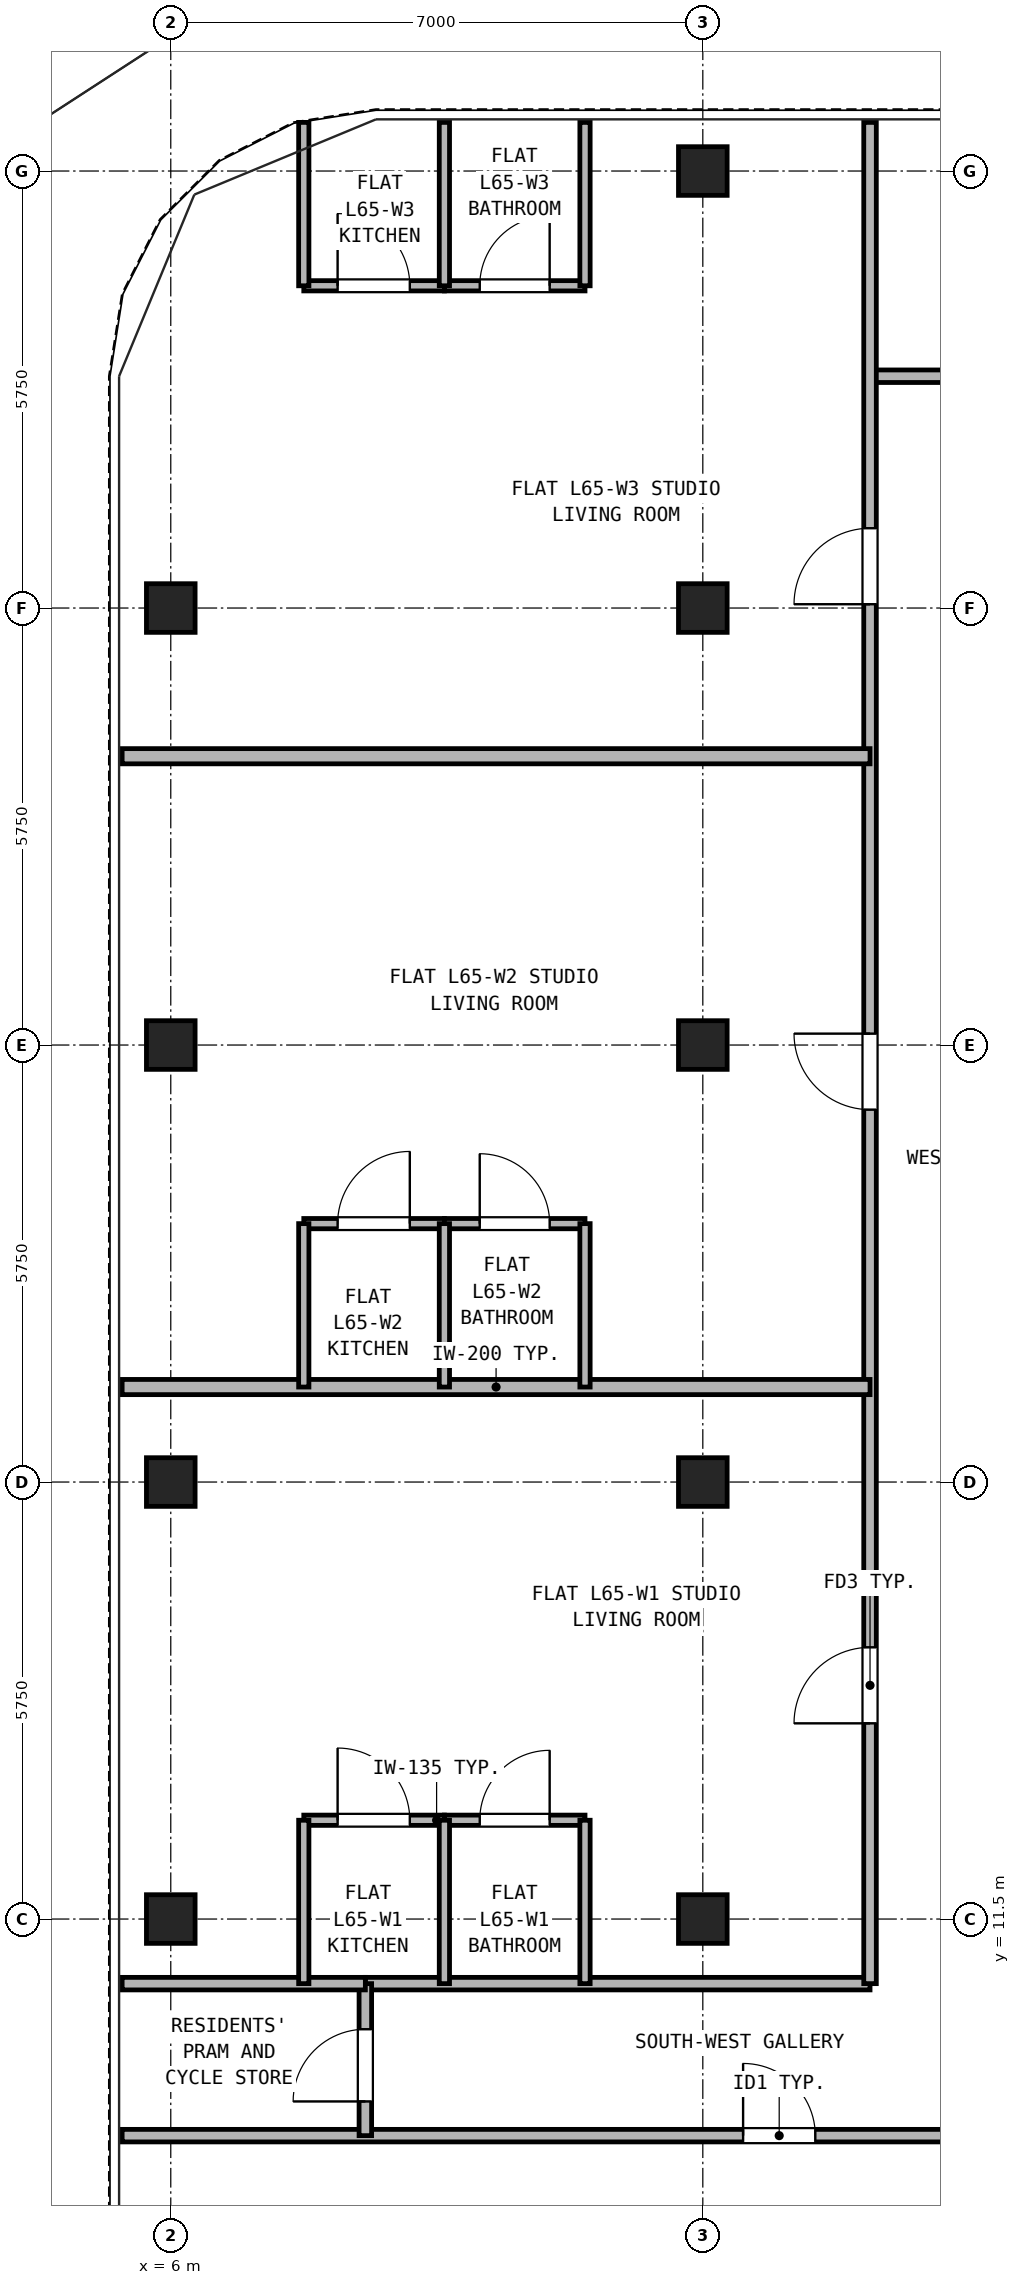
"""IFC4 building model, lengths in metres.
Left out: names, types, materials, properties, quantities, classifications, styles, units other than length and angle.
Written with IfcOpenShell. Run it as: python <this file> out.ifc"""

import sys

from ifc_helpers import new_model, si_unit, direction, frame, frame_2d, origin, origin_2d, place, context, subcontext, project, spatial, rectangle, hollow_rectangle, extrude, source, transform, mapped, element, fill, save


model = new_model("IFC4")
c1 = context("Model", 3, precision=1e-05, world=origin(), true_north=direction((0.0, 1.0)))
c2 = subcontext(c1, "Body", "Model", "MODEL_VIEW")
j1 = project(units=[si_unit("LENGTHUNIT", "METRE"), si_unit("PLANEANGLEUNIT", "RADIAN")], contexts=[c1])
p1 = place(None, origin())
s1 = spatial("IfcSite", under=j1, at=p1, CompositionType="ELEMENT")
p2 = place(p1, origin())
s2 = spatial("IfcBuilding", under=s1, at=p2, CompositionType="ELEMENT")
p3 = place(p2, frame((0.0, 0.0, 229.7)))
s3 = spatial("IfcBuildingStorey", under=s2, at=p3, CompositionType="ELEMENT", Elevation=229.7)
m1 = source(origin(), c2, "Body", "SweptSolid", [
    extrude(hollow_rectangle(XDim=0.64, YDim=0.64, WallThickness=0.035, at=origin_2d()), origin(), (0.0, 0.0, 1.0), 2.98),
])
for number, where, z_axis, x_axis in (
    (1, (13.0, 34.5, 0.0), (0.0, 0.0, 1.0), (1.0, 0.0, 0.0)),
    (2, (6.0, 11.5, 0.0), (0.0, 0.0, 1.0), (1.0, 0.0, 0.0)),
    (3, (6.0, 17.25, 0.0), (0.0, 0.0, 1.0), (1.0, 0.0, 0.0)),
    (4, (6.0, 23.0, 0.0), (0.0, 0.0, 1.0), (1.0, 0.0, 0.0)),
    (5, (6.0, 28.75, 0.0), (0.0, 0.0, 1.0), (1.0, 0.0, 0.0)),
    (6, (13.0, 11.5, 0.0), (0.0, 0.0, 1.0), (1.0, 0.0, 0.0)),
    (7, (13.0, 17.25, 0.0), (0.0, 0.0, 1.0), (1.0, 0.0, 0.0)),
    (8, (13.0, 23.0, 0.0), (0.0, 0.0, 1.0), (1.0, 0.0, 0.0)),
    (9, (13.0, 28.75, 0.0), (0.0, 0.0, 1.0), (1.0, 0.0, 0.0)),
):
    element("IfcColumn", number, at=place(p3, frame(where, z_axis=z_axis, x_axis=x_axis)), inside=s3, PredefinedType="COLUMN", context=c2, shape_type="MappedRepresentation", body=[
        mapped(m1, transform((0.0, 0.0, 0.0), x_axis=(1.0, 0.0, 0.0), y_axis=(0.0, 1.0, 0.0), z_axis=(0.0, 0.0, 1.0), scale=1.0)),
    ])
p4 = place(p3, frame((5.36, 8.65, 0.0), z_axis=(0.0, 0.0, 1.0), x_axis=(1.0, 0.0, 0.0)))
e10 = element("IfcWall", 10, at=p4, inside=s3, PredefinedType="PARTITIONING", context=c2, shape_type="SweptSolid", body=[
    extrude(rectangle(XDim=36.28, YDim=0.165, at=frame_2d((18.14, 0.0))), origin(), (0.0, 0.0, 1.0), 2.655),
])
p5 = place(p4, frame((8.17, 0.0, 0.0)))
e11 = element("IfcOpeningElement", 11, at=p5, cuts=e10, PredefinedType="OPENING", context=c2, shape_type="SweptSolid", body=[
    extrude(rectangle(XDim=0.95, YDim=2.15, at=frame_2d((0.475, 1.075))), frame((0.0, 0.093, 0.0), z_axis=(0.0, -1.0, 0.0), x_axis=(1.0, 0.0, 0.0)), (0.0, 0.0, 1.0), 0.185),
])
p6 = place(p4, frame((18.14, 0.0, 0.0)))
e12 = element("IfcOpeningElement", 12, at=p6, cuts=e10, PredefinedType="OPENING", context=c2, shape_type="SweptSolid", body=[
    extrude(rectangle(XDim=0.95, YDim=2.15, at=frame_2d((0.475, 1.075))), frame((0.0, 0.093, 0.0), z_axis=(0.0, -1.0, 0.0), x_axis=(1.0, 0.0, 0.0)), (0.0, 0.0, 1.0), 0.185),
])
p7 = place(p4, frame((25.14, 0.0, 0.0)))
e13 = element("IfcOpeningElement", 13, at=p7, cuts=e10, PredefinedType="OPENING", context=c2, shape_type="SweptSolid", body=[
    extrude(rectangle(XDim=0.95, YDim=2.15, at=frame_2d((0.475, 1.075))), frame((0.0, 0.093, 0.0), z_axis=(0.0, -1.0, 0.0), x_axis=(1.0, 0.0, 0.0)), (0.0, 0.0, 1.0), 0.185),
])
p8 = place(p4, frame((29.99, 0.0, 0.0)))
e14 = element("IfcOpeningElement", 14, at=p8, cuts=e10, PredefinedType="OPENING", context=c2, shape_type="SweptSolid", body=[
    extrude(rectangle(XDim=0.95, YDim=2.15, at=frame_2d((0.475, 1.075))), frame((0.0, 0.093, 0.0), z_axis=(0.0, -1.0, 0.0), x_axis=(1.0, 0.0, 0.0)), (0.0, 0.0, 1.0), 0.185),
])
p9 = place(p3, frame((8.56, 10.65, 0.0), z_axis=(0.0, 0.0, 1.0), x_axis=(1.0, 0.0, 0.0)))
e15 = element("IfcWall", 15, at=p9, inside=s3, PredefinedType="PARTITIONING", context=c2, shape_type="SweptSolid", body=[
    extrude(rectangle(XDim=6.64, YDim=0.165, at=frame_2d((3.32, 0.0))), origin(), (0.0, 0.0, 1.0), 2.98),
])
p10 = place(p3, frame((8.56, 8.65, 0.0), z_axis=(0.0, 0.0, 1.0), x_axis=(0.0, 1.0, 0.0)))
e16 = element("IfcWall", 16, at=p10, inside=s3, PredefinedType="PARTITIONING", context=c2, shape_type="SweptSolid", body=[
    extrude(rectangle(XDim=2.0, YDim=0.165, at=frame_2d((1.0, 0.0))), origin(), (0.0, 0.0, 1.0), 2.98),
])
p11 = place(p10, frame((0.45, 0.0, 0.0)))
e17 = element("IfcOpeningElement", 17, at=p11, cuts=e16, PredefinedType="OPENING", context=c2, shape_type="SweptSolid", body=[
    extrude(rectangle(XDim=0.95, YDim=2.15, at=frame_2d((0.475, 1.075))), frame((0.0, 0.093, 0.0), z_axis=(0.0, -1.0, 0.0), x_axis=(1.0, 0.0, 0.0)), (0.0, 0.0, 1.0), 0.185),
])
p12 = place(p3, frame((15.2, 31.8, 0.0), z_axis=(0.0, 0.0, 1.0), x_axis=(1.0, 0.0, 0.0)))
e18 = element("IfcWall", 18, at=p12, inside=s3, PredefinedType="PARTITIONING", context=c2, shape_type="SweptSolid", body=[
    extrude(rectangle(XDim=16.6, YDim=0.165, at=frame_2d((8.3, 0.0))), origin(), (0.0, 0.0, 1.0), 2.655),
])
p13 = place(p12, frame((3.65, 0.0, 0.0)))
e19 = element("IfcOpeningElement", 19, at=p13, cuts=e18, PredefinedType="OPENING", context=c2, shape_type="SweptSolid", body=[
    extrude(rectangle(XDim=0.95, YDim=2.15, at=frame_2d((0.475, 1.075))), frame((0.0, 0.093, 0.0), z_axis=(0.0, -1.0, 0.0), x_axis=(1.0, 0.0, 0.0)), (0.0, 0.0, 1.0), 0.185),
])
p14 = place(p12, frame((9.1, 0.0, 0.0)))
e20 = element("IfcOpeningElement", 20, at=p14, cuts=e18, PredefinedType="OPENING", context=c2, shape_type="SweptSolid", body=[
    extrude(rectangle(XDim=0.95, YDim=2.15, at=frame_2d((0.475, 1.075))), frame((0.0, 0.093, 0.0), z_axis=(0.0, -1.0, 0.0), x_axis=(1.0, 0.0, 0.0)), (0.0, 0.0, 1.0), 0.185),
])
p15 = place(p12, frame((13.25, 0.0, 0.0)))
e21 = element("IfcOpeningElement", 21, at=p15, cuts=e18, PredefinedType="OPENING", context=c2, shape_type="SweptSolid", body=[
    extrude(rectangle(XDim=0.92, YDim=2.1, at=frame_2d((0.46, 1.05))), frame((0.0, 0.093, 0.0), z_axis=(0.0, -1.0, 0.0), x_axis=(1.0, 0.0, 0.0)), (0.0, 0.0, 1.0), 0.185),
])
p16 = place(p3, frame((15.2, 10.65, 0.0), z_axis=(0.0, 0.0, 1.0), x_axis=(0.0, 1.0, 0.0)))
e22 = element("IfcWall", 22, at=p16, inside=s3, PredefinedType="PARTITIONING", context=c2, shape_type="SweptSolid", body=[
    extrude(rectangle(XDim=24.49, YDim=0.165, at=frame_2d((12.245, 0.0))), origin(), (0.0, 0.0, 1.0), 2.98),
])
p17 = place(p16, frame((3.425, 0.0, 0.0)))
e23 = element("IfcOpeningElement", 23, at=p17, cuts=e22, PredefinedType="OPENING", context=c2, shape_type="SweptSolid", body=[
    extrude(rectangle(XDim=1.0, YDim=2.15, at=frame_2d((0.5, 1.075))), frame((0.0, 0.093, 0.0), z_axis=(0.0, -1.0, 0.0), x_axis=(1.0, 0.0, 0.0)), (0.0, 0.0, 1.0), 0.185),
])
p18 = place(p16, frame((11.5, 0.0, 0.0)))
e24 = element("IfcOpeningElement", 24, at=p18, cuts=e22, PredefinedType="OPENING", context=c2, shape_type="SweptSolid", body=[
    extrude(rectangle(XDim=1.0, YDim=2.15, at=frame_2d((0.5, 1.075))), frame((0.0, 0.093, 0.0), z_axis=(0.0, -1.0, 0.0), x_axis=(1.0, 0.0, 0.0)), (0.0, 0.0, 1.0), 0.185),
])
p19 = place(p16, frame((18.15, 0.0, 0.0)))
e25 = element("IfcOpeningElement", 25, at=p19, cuts=e22, PredefinedType="OPENING", context=c2, shape_type="SweptSolid", body=[
    extrude(rectangle(XDim=1.0, YDim=2.15, at=frame_2d((0.5, 1.075))), frame((0.0, 0.093, 0.0), z_axis=(0.0, -1.0, 0.0), x_axis=(1.0, 0.0, 0.0)), (0.0, 0.0, 1.0), 0.185),
])
p20 = place(p3, frame((5.36, 10.65, 0.0), z_axis=(0.0, 0.0, 1.0), x_axis=(1.0, 0.0, 0.0)))
e26 = element("IfcWall", 26, at=p20, inside=s3, PredefinedType="PARTITIONING", context=c2, shape_type="SweptSolid", body=[
    extrude(rectangle(XDim=3.2, YDim=0.165, at=frame_2d((1.6, 0.0))), origin(), (0.0, 0.0, 1.0), 2.98),
])
p21 = place(p3, frame((7.75, 12.8, 0.0), z_axis=(0.0, 0.0, 1.0), x_axis=(1.0, 0.0, 0.0)))
e27 = element("IfcWall", 27, at=p21, inside=s3, PredefinedType="PARTITIONING", context=c2, shape_type="SweptSolid", body=[
    extrude(rectangle(XDim=1.85, YDim=0.135, at=frame_2d((0.925, 0.0))), origin(), (0.0, 0.0, 1.0), 2.98),
])
p22 = place(p21, frame((0.445, 0.0, 0.0)))
e28 = element("IfcOpeningElement", 28, at=p22, cuts=e27, PredefinedType="OPENING", context=c2, shape_type="SweptSolid", body=[
    extrude(rectangle(XDim=0.95, YDim=2.15, at=frame_2d((0.475, 1.075))), frame((0.0, 0.077, 0.0), z_axis=(0.0, -1.0, 0.0), x_axis=(1.0, 0.0, 0.0)), (0.0, 0.0, 1.0), 0.155),
])
p23 = place(p3, frame((9.6, 12.8, 0.0), z_axis=(0.0, 0.0, 1.0), x_axis=(1.0, 0.0, 0.0)))
e29 = element("IfcWall", 29, at=p23, inside=s3, PredefinedType="PARTITIONING", context=c2, shape_type="SweptSolid", body=[
    extrude(rectangle(XDim=1.85, YDim=0.135, at=frame_2d((0.925, 0.0))), origin(), (0.0, 0.0, 1.0), 2.98),
])
p24 = place(p23, frame((0.465, 0.0, 0.0)))
e30 = element("IfcOpeningElement", 30, at=p24, cuts=e29, PredefinedType="OPENING", context=c2, shape_type="SweptSolid", body=[
    extrude(rectangle(XDim=0.92, YDim=2.1, at=frame_2d((0.46, 1.05))), frame((0.0, 0.077, 0.0), z_axis=(0.0, -1.0, 0.0), x_axis=(1.0, 0.0, 0.0)), (0.0, 0.0, 1.0), 0.155),
])
for number, where, z_axis, x_axis in (
    (31, (7.75, 10.65, 0.0), (0.0, 0.0, 1.0), (0.0, 1.0, 0.0)),
    (32, (9.6, 10.65, 0.0), (0.0, 0.0, 1.0), (0.0, 1.0, 0.0)),
    (33, (11.45, 10.65, 0.0), (0.0, 0.0, 1.0), (0.0, 1.0, 0.0)),
):
    element("IfcWall", number, at=place(p3, frame(where, z_axis=z_axis, x_axis=x_axis)), inside=s3, PredefinedType="PARTITIONING", context=c2, shape_type="SweptSolid", body=[
        extrude(rectangle(XDim=2.15, YDim=0.135, at=frame_2d((1.075, 0.0))), origin(), (0.0, 0.0, 1.0), 2.98),
    ])
p25 = place(p3, frame((5.36, 18.5, 0.0), z_axis=(0.0, 0.0, 1.0), x_axis=(1.0, 0.0, 0.0)))
e34 = element("IfcWall", 34, at=p25, inside=s3, PredefinedType="PARTITIONING", context=c2, shape_type="SweptSolid", body=[
    extrude(rectangle(XDim=9.84, YDim=0.2, at=frame_2d((4.92, 0.0))), origin(), (0.0, 0.0, 1.0), 2.98),
])
p26 = place(p3, frame((7.75, 20.65, 0.0), z_axis=(0.0, 0.0, 1.0), x_axis=(1.0, 0.0, 0.0)))
e35 = element("IfcWall", 35, at=p26, inside=s3, PredefinedType="PARTITIONING", context=c2, shape_type="SweptSolid", body=[
    extrude(rectangle(XDim=1.85, YDim=0.135, at=frame_2d((0.925, 0.0))), origin(), (0.0, 0.0, 1.0), 2.98),
])
p27 = place(p26, frame((0.445, 0.0, 0.0)))
e36 = element("IfcOpeningElement", 36, at=p27, cuts=e35, PredefinedType="OPENING", context=c2, shape_type="SweptSolid", body=[
    extrude(rectangle(XDim=0.95, YDim=2.15, at=frame_2d((0.475, 1.075))), frame((0.0, 0.077, 0.0), z_axis=(0.0, -1.0, 0.0), x_axis=(1.0, 0.0, 0.0)), (0.0, 0.0, 1.0), 0.155),
])
p28 = place(p3, frame((9.6, 20.65, 0.0), z_axis=(0.0, 0.0, 1.0), x_axis=(1.0, 0.0, 0.0)))
e37 = element("IfcWall", 37, at=p28, inside=s3, PredefinedType="PARTITIONING", context=c2, shape_type="SweptSolid", body=[
    extrude(rectangle(XDim=1.85, YDim=0.135, at=frame_2d((0.925, 0.0))), origin(), (0.0, 0.0, 1.0), 2.98),
])
p29 = place(p28, frame((0.465, 0.0, 0.0)))
e38 = element("IfcOpeningElement", 38, at=p29, cuts=e37, PredefinedType="OPENING", context=c2, shape_type="SweptSolid", body=[
    extrude(rectangle(XDim=0.92, YDim=2.1, at=frame_2d((0.46, 1.05))), frame((0.0, 0.077, 0.0), z_axis=(0.0, -1.0, 0.0), x_axis=(1.0, 0.0, 0.0)), (0.0, 0.0, 1.0), 0.155),
])
for number, where, z_axis, x_axis in (
    (39, (7.75, 18.5, 0.0), (0.0, 0.0, 1.0), (0.0, 1.0, 0.0)),
    (40, (9.6, 18.5, 0.0), (0.0, 0.0, 1.0), (0.0, 1.0, 0.0)),
    (41, (11.45, 18.5, 0.0), (0.0, 0.0, 1.0), (0.0, 1.0, 0.0)),
):
    element("IfcWall", number, at=place(p3, frame(where, z_axis=z_axis, x_axis=x_axis)), inside=s3, PredefinedType="PARTITIONING", context=c2, shape_type="SweptSolid", body=[
        extrude(rectangle(XDim=2.15, YDim=0.135, at=frame_2d((1.075, 0.0))), origin(), (0.0, 0.0, 1.0), 2.98),
    ])
p30 = place(p3, frame((5.36, 26.8, 0.0), z_axis=(0.0, 0.0, 1.0), x_axis=(1.0, 0.0, 0.0)))
e42 = element("IfcWall", 42, at=p30, inside=s3, PredefinedType="PARTITIONING", context=c2, shape_type="SweptSolid", body=[
    extrude(rectangle(XDim=9.84, YDim=0.2, at=frame_2d((4.92, 0.0))), origin(), (0.0, 0.0, 1.0), 2.98),
])
p31 = place(p3, frame((7.75, 32.99, 0.0), z_axis=(0.0, 0.0, 1.0), x_axis=(1.0, 0.0, 0.0)))
e43 = element("IfcWall", 43, at=p31, inside=s3, PredefinedType="PARTITIONING", context=c2, shape_type="SweptSolid", body=[
    extrude(rectangle(XDim=1.85, YDim=0.135, at=frame_2d((0.925, 0.0))), origin(), (0.0, 0.0, 1.0), 2.98),
])
p32 = place(p31, frame((0.445, 0.0, 0.0)))
e44 = element("IfcOpeningElement", 44, at=p32, cuts=e43, PredefinedType="OPENING", context=c2, shape_type="SweptSolid", body=[
    extrude(rectangle(XDim=0.95, YDim=2.15, at=frame_2d((0.475, 1.075))), frame((0.0, 0.077, 0.0), z_axis=(0.0, -1.0, 0.0), x_axis=(1.0, 0.0, 0.0)), (0.0, 0.0, 1.0), 0.155),
])
p33 = place(p3, frame((9.6, 32.99, 0.0), z_axis=(0.0, 0.0, 1.0), x_axis=(1.0, 0.0, 0.0)))
e45 = element("IfcWall", 45, at=p33, inside=s3, PredefinedType="PARTITIONING", context=c2, shape_type="SweptSolid", body=[
    extrude(rectangle(XDim=1.85, YDim=0.135, at=frame_2d((0.925, 0.0))), origin(), (0.0, 0.0, 1.0), 2.98),
])
p34 = place(p33, frame((0.465, 0.0, 0.0)))
e46 = element("IfcOpeningElement", 46, at=p34, cuts=e45, PredefinedType="OPENING", context=c2, shape_type="SweptSolid", body=[
    extrude(rectangle(XDim=0.92, YDim=2.1, at=frame_2d((0.46, 1.05))), frame((0.0, 0.077, 0.0), z_axis=(0.0, -1.0, 0.0), x_axis=(1.0, 0.0, 0.0)), (0.0, 0.0, 1.0), 0.155),
])
for number, where, z_axis, x_axis in (
    (47, (7.75, 32.99, 0.0), (0.0, 0.0, 1.0), (0.0, 1.0, 0.0)),
    (48, (9.6, 32.99, 0.0), (0.0, 0.0, 1.0), (0.0, 1.0, 0.0)),
    (49, (11.45, 32.99, 0.0), (0.0, 0.0, 1.0), (0.0, 1.0, 0.0)),
):
    element("IfcWall", number, at=place(p3, frame(where, z_axis=z_axis, x_axis=x_axis)), inside=s3, PredefinedType="PARTITIONING", context=c2, shape_type="SweptSolid", body=[
        extrude(rectangle(XDim=2.15, YDim=0.135, at=frame_2d((1.075, 0.0))), origin(), (0.0, 0.0, 1.0), 2.98),
    ])
p35 = place(p5, frame((0.95, 0.0, 0.0), z_axis=(0.0, 0.0, 1.0), x_axis=(-1.0, 0.0, 0.0)))
e50 = element("IfcDoor", 50, at=p35, inside=s3, OperationType="SINGLE_SWING_LEFT", PredefinedType="DOOR", context=c2, shape_type="SweptSolid", body=[
    extrude(rectangle(XDim=0.95, YDim=2.15, at=frame_2d((0.475, 1.075))), frame((0.0, 0.025, 0.0), z_axis=(0.0, -1.0, 0.0), x_axis=(1.0, 0.0, 0.0)), (0.0, 0.0, 1.0), 0.05),
])
fill(e11, e50)
p36 = place(p11, frame((0.95, 0.0, 0.0), z_axis=(0.0, 0.0, 1.0), x_axis=(-1.0, 0.0, 0.0)))
e51 = element("IfcDoor", 51, at=p36, inside=s3, OperationType="SINGLE_SWING_LEFT", PredefinedType="DOOR", context=c2, shape_type="SweptSolid", body=[
    extrude(rectangle(XDim=0.95, YDim=2.15, at=frame_2d((0.475, 1.075))), frame((0.0, 0.025, 0.0), z_axis=(0.0, -1.0, 0.0), x_axis=(1.0, 0.0, 0.0)), (0.0, 0.0, 1.0), 0.05),
])
fill(e17, e51)
p37 = place(p22, origin())
e52 = element("IfcDoor", 52, at=p37, inside=s3, OperationType="SINGLE_SWING_LEFT", PredefinedType="DOOR", context=c2, shape_type="SweptSolid", body=[
    extrude(rectangle(XDim=0.95, YDim=2.15, at=frame_2d((0.475, 1.075))), frame((0.0, 0.025, 0.0), z_axis=(0.0, -1.0, 0.0), x_axis=(1.0, 0.0, 0.0)), (0.0, 0.0, 1.0), 0.05),
])
fill(e28, e52)
p38 = place(p24, origin())
e53 = element("IfcDoor", 53, at=p38, inside=s3, OperationType="SINGLE_SWING_RIGHT", PredefinedType="DOOR", context=c2, shape_type="SweptSolid", body=[
    extrude(rectangle(XDim=0.92, YDim=2.1, at=frame_2d((0.46, 1.05))), frame((0.0, 0.025, 0.0), z_axis=(0.0, -1.0, 0.0), x_axis=(1.0, 0.0, 0.0)), (0.0, 0.0, 1.0), 0.05),
])
fill(e30, e53)
p39 = place(p17, origin())
e54 = element("IfcDoor", 54, at=p39, inside=s3, OperationType="SINGLE_SWING_LEFT", PredefinedType="DOOR", context=c2, shape_type="SweptSolid", body=[
    extrude(rectangle(XDim=1.0, YDim=2.15, at=frame_2d((0.5, 1.075))), frame((0.0, 0.025, 0.0), z_axis=(0.0, -1.0, 0.0), x_axis=(1.0, 0.0, 0.0)), (0.0, 0.0, 1.0), 0.05),
])
fill(e23, e54)
p40 = place(p27, origin())
e55 = element("IfcDoor", 55, at=p40, inside=s3, OperationType="SINGLE_SWING_RIGHT", PredefinedType="DOOR", context=c2, shape_type="SweptSolid", body=[
    extrude(rectangle(XDim=0.95, YDim=2.15, at=frame_2d((0.475, 1.075))), frame((0.0, 0.025, 0.0), z_axis=(0.0, -1.0, 0.0), x_axis=(1.0, 0.0, 0.0)), (0.0, 0.0, 1.0), 0.05),
])
fill(e36, e55)
p41 = place(p29, origin())
e56 = element("IfcDoor", 56, at=p41, inside=s3, OperationType="SINGLE_SWING_LEFT", PredefinedType="DOOR", context=c2, shape_type="SweptSolid", body=[
    extrude(rectangle(XDim=0.92, YDim=2.1, at=frame_2d((0.46, 1.05))), frame((0.0, 0.025, 0.0), z_axis=(0.0, -1.0, 0.0), x_axis=(1.0, 0.0, 0.0)), (0.0, 0.0, 1.0), 0.05),
])
fill(e38, e56)
p42 = place(p18, origin())
e57 = element("IfcDoor", 57, at=p42, inside=s3, OperationType="SINGLE_SWING_RIGHT", PredefinedType="DOOR", context=c2, shape_type="SweptSolid", body=[
    extrude(rectangle(XDim=1.0, YDim=2.15, at=frame_2d((0.5, 1.075))), frame((0.0, 0.025, 0.0), z_axis=(0.0, -1.0, 0.0), x_axis=(1.0, 0.0, 0.0)), (0.0, 0.0, 1.0), 0.05),
])
fill(e24, e57)
p43 = place(p32, frame((0.95, 0.0, 0.0), z_axis=(0.0, 0.0, 1.0), x_axis=(-1.0, 0.0, 0.0)))
e58 = element("IfcDoor", 58, at=p43, inside=s3, OperationType="SINGLE_SWING_LEFT", PredefinedType="DOOR", context=c2, shape_type="SweptSolid", body=[
    extrude(rectangle(XDim=0.95, YDim=2.15, at=frame_2d((0.475, 1.075))), frame((0.0, 0.025, 0.0), z_axis=(0.0, -1.0, 0.0), x_axis=(1.0, 0.0, 0.0)), (0.0, 0.0, 1.0), 0.05),
])
fill(e44, e58)
p44 = place(p34, frame((0.92, 0.0, 0.0), z_axis=(0.0, 0.0, 1.0), x_axis=(-1.0, 0.0, 0.0)))
e59 = element("IfcDoor", 59, at=p44, inside=s3, OperationType="SINGLE_SWING_RIGHT", PredefinedType="DOOR", context=c2, shape_type="SweptSolid", body=[
    extrude(rectangle(XDim=0.92, YDim=2.1, at=frame_2d((0.46, 1.05))), frame((0.0, 0.025, 0.0), z_axis=(0.0, -1.0, 0.0), x_axis=(1.0, 0.0, 0.0)), (0.0, 0.0, 1.0), 0.05),
])
fill(e46, e59)
p45 = place(p19, origin())
e60 = element("IfcDoor", 60, at=p45, inside=s3, OperationType="SINGLE_SWING_LEFT", PredefinedType="DOOR", context=c2, shape_type="SweptSolid", body=[
    extrude(rectangle(XDim=1.0, YDim=2.15, at=frame_2d((0.5, 1.075))), frame((0.0, 0.025, 0.0), z_axis=(0.0, -1.0, 0.0), x_axis=(1.0, 0.0, 0.0)), (0.0, 0.0, 1.0), 0.05),
])
fill(e25, e60)
save(model, sys.argv[1])
